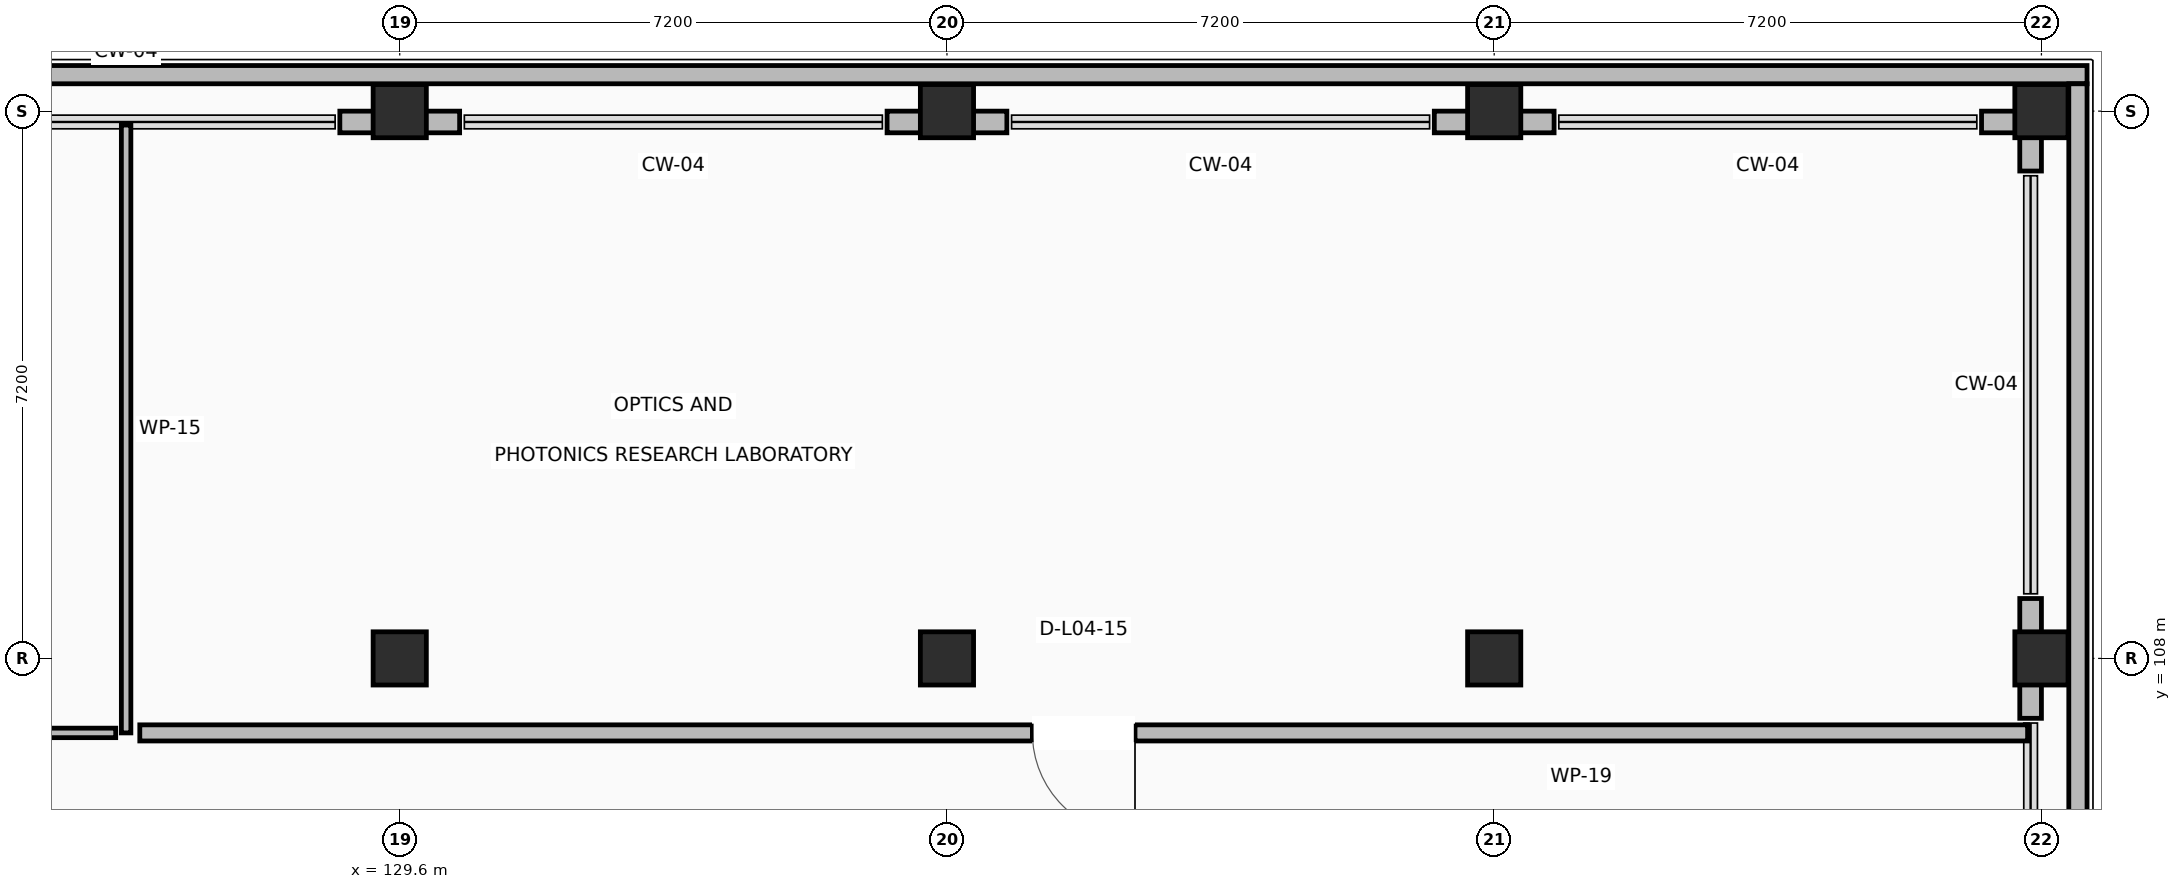
"""IFC4 building model, lengths in metres.
Left out: names, types, materials, properties, quantities, classifications, styles, units other than length and angle.
Written with IfcOpenShell. Run it as: python <this file> out.ifc"""

import sys

from ifc_helpers import new_model, si_unit, direction, frame, frame_2d, origin, origin_2d, place, context, subcontext, project, spatial, rectangle, extrude, element, fill, save


model = new_model("IFC4")
c1 = context("Model", 3, precision=1e-05, world=origin(), true_north=direction((0.0, 1.0)))
c2 = subcontext(c1, "Body", "Model", "MODEL_VIEW")
j1 = project(units=[si_unit("LENGTHUNIT", "METRE"), si_unit("PLANEANGLEUNIT", "RADIAN")], contexts=[c1])
p1 = place(None, origin())
s1 = spatial("IfcSite", under=j1, at=p1, CompositionType="ELEMENT")
p2 = place(p1, origin())
s2 = spatial("IfcBuilding", under=s1, at=p2, CompositionType="ELEMENT")
p3 = place(p2, frame((0.0, 0.0, 18.0)))
s3 = spatial("IfcBuildingStorey", under=s2, at=p3, CompositionType="ELEMENT", Elevation=18.0)
for number, where, z_axis, x_axis in (
    (1, (129.6, 108.0, 0.0), (0.0, 0.0, 1.0), (1.0, 0.0, 0.0)),
    (2, (129.6, 115.2, 0.0), (0.0, 0.0, 1.0), (1.0, 0.0, 0.0)),
    (3, (136.8, 108.0, 0.0), (0.0, 0.0, 1.0), (1.0, 0.0, 0.0)),
    (4, (136.8, 115.2, 0.0), (0.0, 0.0, 1.0), (1.0, 0.0, 0.0)),
    (5, (144.0, 108.0, 0.0), (0.0, 0.0, 1.0), (1.0, 0.0, 0.0)),
    (6, (144.0, 115.2, 0.0), (0.0, 0.0, 1.0), (1.0, 0.0, 0.0)),
    (7, (151.2, 108.0, 0.0), (0.0, 0.0, 1.0), (1.0, 0.0, 0.0)),
    (8, (151.2, 115.2, 0.0), (0.0, 0.0, 1.0), (1.0, 0.0, 0.0)),
):
    element("IfcColumn", number, at=place(p3, frame(where, z_axis=z_axis, x_axis=x_axis)), inside=s3, PredefinedType="COLUMN", context=c2, shape_type="SweptSolid", body=[
        extrude(rectangle(XDim=0.7, YDim=0.7, at=origin_2d()), origin(), (0.0, 0.0, 1.0), 4.22),
    ])
p4 = place(p3, frame((151.058, 107.212, 0.0), z_axis=(0.0, 0.0, 1.0), x_axis=(0.0, 1.0, 0.0)))
e9 = element("IfcWall", 9, at=p4, inside=s3, PredefinedType="STANDARD", context=c2, shape_type="SweptSolid", body=[
    extrude(rectangle(XDim=1.576, YDim=0.285, at=frame_2d((0.788, 0.0))), origin(), (0.0, 0.0, 1.0), 3.26),
])
p5 = place(p3, frame((151.058, 114.412, 0.0), z_axis=(0.0, 0.0, 1.0), x_axis=(0.0, 1.0, 0.0)))
e10 = element("IfcWall", 10, at=p5, inside=s3, PredefinedType="STANDARD", context=c2, shape_type="SweptSolid", body=[
    extrude(rectangle(XDim=0.503, YDim=0.285, at=frame_2d((0.251, 0.0))), origin(), (0.0, 0.0, 1.0), 3.26),
])
p6 = place(p3, frame((151.2, 115.058, 0.0), z_axis=(0.0, 0.0, 1.0), x_axis=(-1.0, 0.0, 0.0)))
e11 = element("IfcWall", 11, at=p6, inside=s3, PredefinedType="STANDARD", context=c2, shape_type="SweptSolid", body=[
    extrude(rectangle(XDim=0.788, YDim=0.285, at=frame_2d((0.394, 0.0))), origin(), (0.0, 0.0, 1.0), 3.26),
])
p7 = place(p3, frame((144.788, 115.058, 0.0), z_axis=(0.0, 0.0, 1.0), x_axis=(-1.0, 0.0, 0.0)))
e12 = element("IfcWall", 12, at=p7, inside=s3, PredefinedType="STANDARD", context=c2, shape_type="SweptSolid", body=[
    extrude(rectangle(XDim=1.576, YDim=0.285, at=frame_2d((0.788, 0.0))), origin(), (0.0, 0.0, 1.0), 3.26),
])
for number, where, z_axis, x_axis in (
    (13, (137.588, 115.058, 0.0), (0.0, 0.0, 1.0), (-1.0, 0.0, 0.0)),
    (14, (130.388, 115.058, 0.0), (0.0, 0.0, 1.0), (-1.0, 0.0, 0.0)),
):
    element("IfcWall", number, at=place(p3, frame(where, z_axis=z_axis, x_axis=x_axis)), inside=s3, PredefinedType="STANDARD", context=c2, shape_type="SweptSolid", body=[
        extrude(rectangle(XDim=1.576, YDim=0.285, at=frame_2d((0.788, 0.0))), origin(), (0.0, 0.0, 1.0), 3.26),
    ])
p8 = place(p3, frame((78.6, 115.68, 0.0), z_axis=(0.0, 0.0, 1.0), x_axis=(1.0, 0.0, 0.0)))
e15 = element("IfcWall", 15, at=p8, inside=s3, PredefinedType="PARAPET", context=c2, shape_type="SweptSolid", body=[
    extrude(rectangle(XDim=73.2, YDim=0.24, at=frame_2d((36.6, 0.0))), origin(), (0.0, 0.0, 1.0), 1.12),
])
p9 = place(p3, frame((151.68, 115.56, 0.0), z_axis=(0.0, 0.0, 1.0), x_axis=(0.0, -1.0, 0.0)))
e16 = element("IfcWall", 16, at=p9, inside=s3, PredefinedType="PARAPET", context=c2, shape_type="SweptSolid", body=[
    extrude(rectangle(XDim=21.36, YDim=0.24, at=frame_2d((10.68, 0.0))), origin(), (0.0, 0.0, 1.0), 1.12),
])
p10 = place(p3, frame((126.0, 115.017, 0.0), z_axis=(0.0, 0.0, 1.0), x_axis=(0.0, -1.0, 0.0)))
e17 = element("IfcWall", 17, at=p10, inside=s3, PredefinedType="PARTITIONING", context=c2, shape_type="SweptSolid", body=[
    extrude(rectangle(XDim=7.997, YDim=0.125, at=frame_2d((3.999, 0.0))), origin(), (0.0, 0.0, 1.0), 3.26),
])
p11 = place(p3, frame((125.863, 107.02, 0.0), z_axis=(0.0, 0.0, 1.0), x_axis=(-1.0, 0.0, 0.0)))
e18 = element("IfcWall", 18, at=p11, inside=s3, PredefinedType="PARTITIONING", context=c2, shape_type="SweptSolid", body=[
    extrude(rectangle(XDim=23.096, YDim=0.125, at=frame_2d((11.548, 0.0))), origin(), (0.0, 0.0, 1.0), 3.26),
])
p12 = place(p11, frame((11.228, 0.0, 0.0)))
e19 = element("IfcOpeningElement", 19, at=p12, cuts=e18, PredefinedType="OPENING", context=c2, shape_type="SweptSolid", body=[
    extrude(rectangle(XDim=0.94, YDim=2.1, at=frame_2d((0.47, 1.05))), frame((0.0, 0.073, 0.0), z_axis=(0.0, -1.0, 0.0), x_axis=(1.0, 0.0, 0.0)), (0.0, 0.0, 1.0), 0.145),
])
p13 = place(p3, frame((151.018, 107.02, 0.0), z_axis=(0.0, 0.0, 1.0), x_axis=(-1.0, 0.0, 0.0)))
e20 = element("IfcWall", 20, at=p13, inside=s3, PredefinedType="PARTITIONING", context=c2, shape_type="SweptSolid", body=[
    extrude(rectangle(XDim=24.838, YDim=0.212, at=frame_2d((12.419, 0.0))), origin(), (0.0, 0.0, 1.0), 3.26),
])
p14 = place(p13, frame((11.744, 0.0, 0.0)))
e21 = element("IfcOpeningElement", 21, at=p14, cuts=e20, PredefinedType="OPENING", context=c2, shape_type="SweptSolid", body=[
    extrude(rectangle(XDim=1.35, YDim=2.15, at=frame_2d((0.675, 1.075))), frame((0.0, 0.116, 0.0), z_axis=(0.0, -1.0, 0.0), x_axis=(1.0, 0.0, 0.0)), (0.0, 0.0, 1.0), 0.232),
])
p15 = place(p14, origin())
e22 = element("IfcDoor", 22, at=p15, inside=s3, OperationType="SINGLE_SWING_LEFT", PredefinedType="DOOR", context=c2, shape_type="SweptSolid", body=[
    extrude(rectangle(XDim=1.35, YDim=2.15, at=frame_2d((0.675, 1.075))), frame((0.0, 0.025, 0.0), z_axis=(0.0, -1.0, 0.0), x_axis=(1.0, 0.0, 0.0)), (0.0, 0.0, 1.0), 0.05),
])
fill(e21, e22)
save(model, sys.argv[1])
